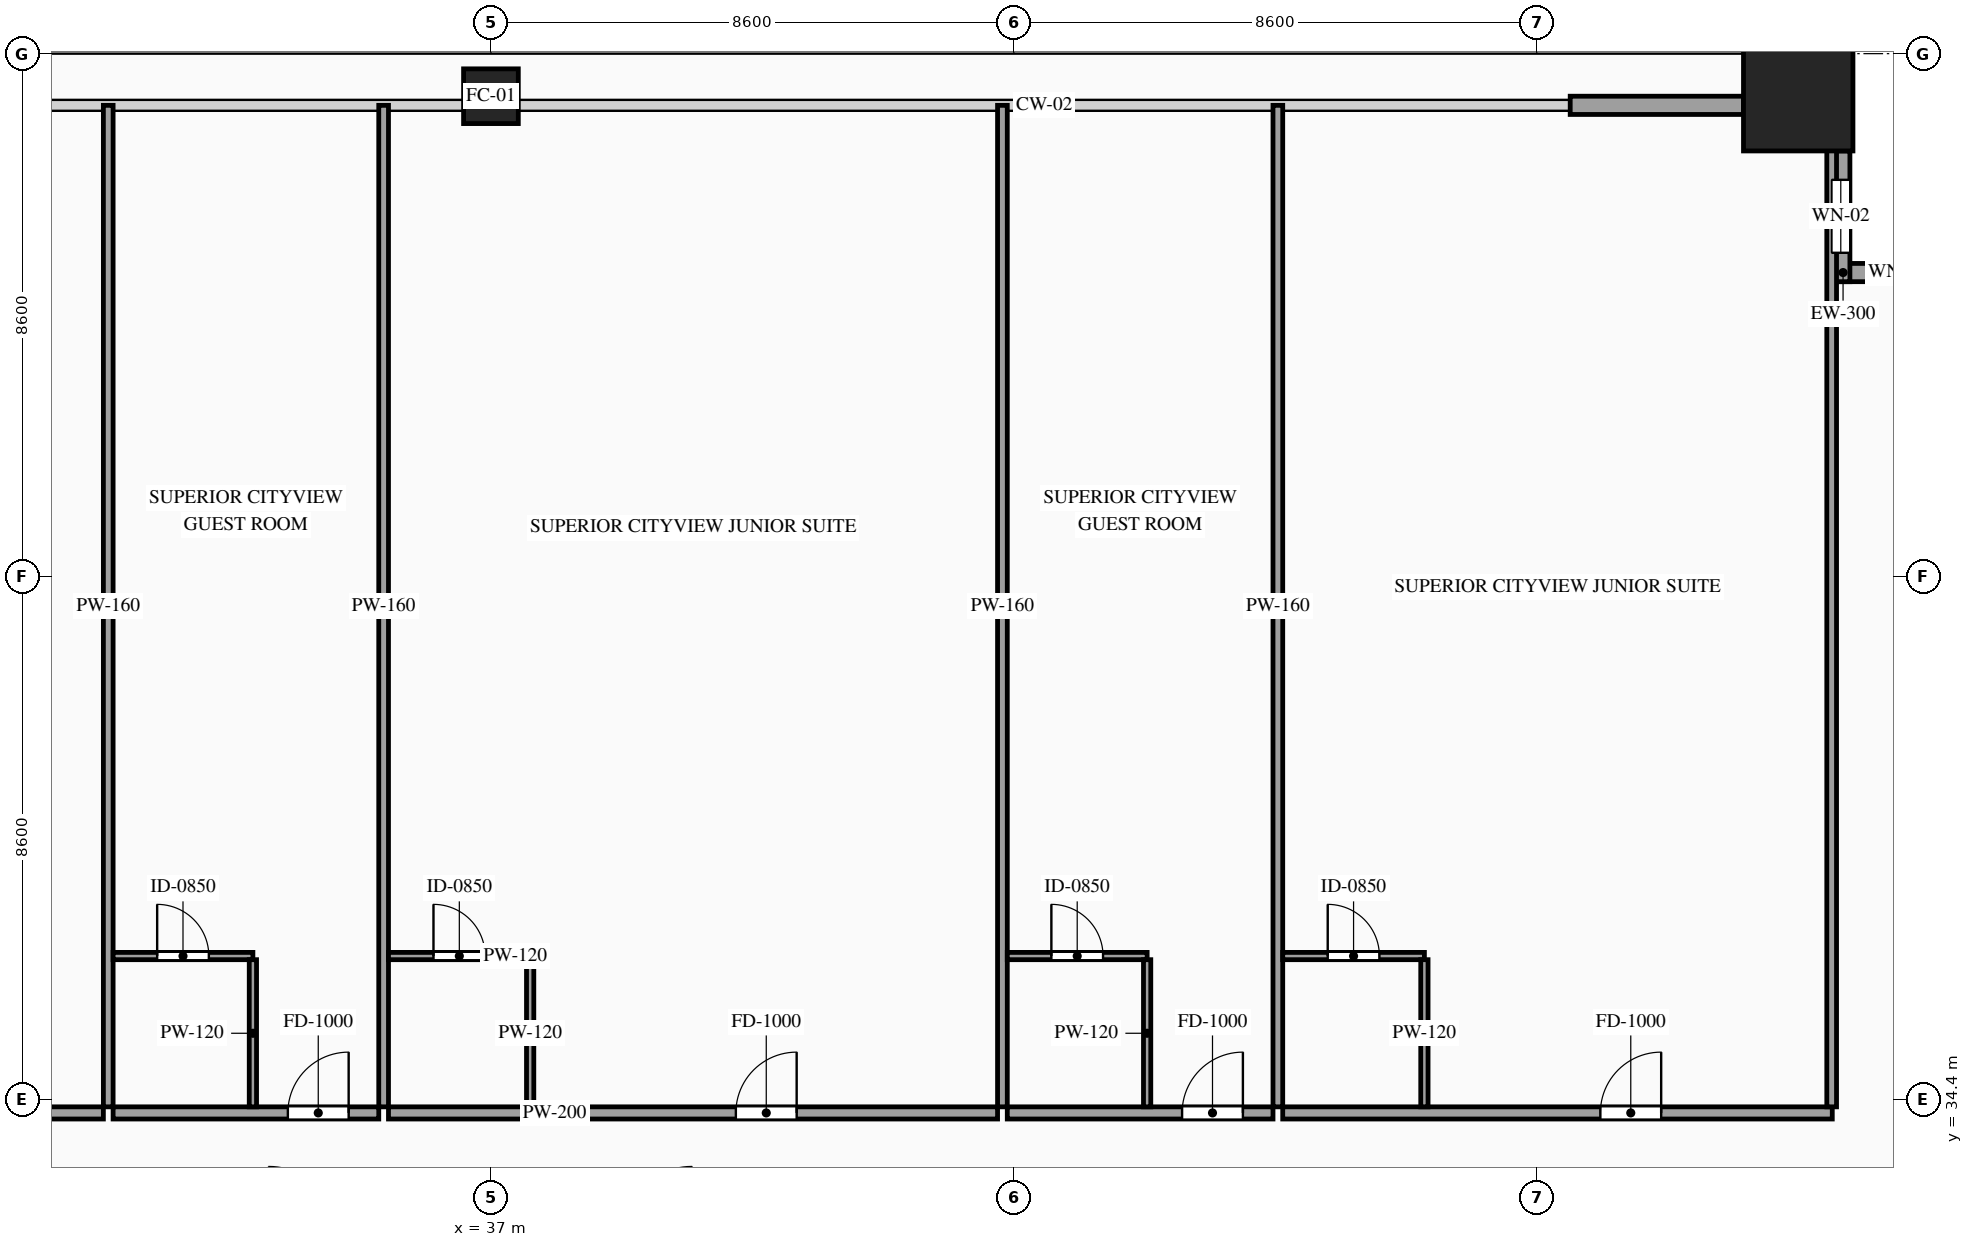
"""IFC4 building model, lengths in metres.
Left out: names, types, materials, properties, quantities, classifications, styles, units other than length and angle.
Written with IfcOpenShell. Run it as: python <this file> out.ifc"""

import sys

from ifc_helpers import new_model, si_unit, direction, frame, frame_2d, origin, origin_2d, place, context, subcontext, project, spatial, rectangle, hollow_rectangle, extrude, source, transform, mapped, element, fill, save


model = new_model("IFC4")
c1 = context("Model", 3, precision=1e-05, world=origin(), true_north=direction((0.0, 1.0)))
c2 = subcontext(c1, "Body", "Model", "MODEL_VIEW")
j1 = project(units=[si_unit("LENGTHUNIT", "METRE"), si_unit("PLANEANGLEUNIT", "RADIAN")], contexts=[c1])
p1 = place(None, origin())
s1 = spatial("IfcSite", under=j1, at=p1, CompositionType="ELEMENT")
p2 = place(p1, origin())
s2 = spatial("IfcBuilding", under=s1, at=p2, CompositionType="ELEMENT")
p3 = place(p2, frame((0.0, 0.0, 67.6)))
s3 = spatial("IfcBuildingStorey", under=s2, at=p3, CompositionType="ELEMENT", Elevation=67.6)
m1 = source(origin(), c2, "Body", "SweptSolid", [
    extrude(hollow_rectangle(XDim=0.9, YDim=0.9, WallThickness=0.042, at=origin_2d()), origin(), (0.0, 0.0, 1.0), 3.6),
])
p4 = place(p3, frame((37.0, 50.9, 0.0), z_axis=(0.0, 0.0, 1.0), x_axis=(1.0, 0.0, 0.0)))
e1 = element("IfcColumn", 1, at=p4, inside=s3, PredefinedType="COLUMN", context=c2, shape_type="MappedRepresentation", body=[
    mapped(m1, transform((0.0, 0.0, 0.0), scale=1.0)),
])
m2 = source(origin(), c2, "Body", "SweptSolid", [
    extrude(hollow_rectangle(XDim=1.8, YDim=1.8, WallThickness=0.08, at=origin_2d()), origin(), (0.0, 0.0, 1.0), 3.6),
])
p5 = place(p3, frame((58.5, 50.9, 0.0), z_axis=(0.0, 0.0, 1.0), x_axis=(1.0, 0.0, 0.0)))
e2 = element("IfcColumn", 2, at=p5, inside=s3, PredefinedType="COLUMN", context=c2, shape_type="MappedRepresentation", body=[
    mapped(m2, transform((0.0, 0.0, 0.0), scale=1.0)),
])
p6 = place(p3, frame((61.2, 48.0, 0.0), z_axis=(0.0, 0.0, 1.0), x_axis=(-1.0, 0.0, 0.0)))
e3 = element("IfcWall", 3, at=p6, inside=s3, PredefinedType="SOLIDWALL", context=c2, shape_type="SweptSolid", body=[
    extrude(rectangle(XDim=2.15, YDim=0.3, at=frame_2d((1.075, 0.0))), origin(), (0.0, 0.0, 1.0), 3.38),
])
p7 = place(p6, frame((0.625, 0.0, 0.85)))
e4 = element("IfcOpeningElement", 4, at=p7, cuts=e3, PredefinedType="OPENING", context=c2, shape_type="SweptSolid", body=[
    extrude(rectangle(XDim=0.9, YDim=1.5, at=frame_2d((0.45, 0.75))), frame((0.0, 0.165, 0.0), z_axis=(0.0, -1.0, 0.0), x_axis=(1.0, 0.0, 0.0)), (0.0, 0.0, 1.0), 0.33),
])
p8 = place(p3, frame((59.2, 47.85, 0.0), z_axis=(0.0, 0.0, 1.0), x_axis=(0.0, 1.0, 0.0)))
e5 = element("IfcWall", 5, at=p8, inside=s3, PredefinedType="SOLIDWALL", context=c2, shape_type="SweptSolid", body=[
    extrude(rectangle(XDim=2.15, YDim=0.3, at=frame_2d((1.075, 0.0))), origin(), (0.0, 0.0, 1.0), 3.38),
])
p9 = place(p8, frame((0.475, 0.0, 0.85)))
e6 = element("IfcOpeningElement", 6, at=p9, cuts=e5, PredefinedType="OPENING", context=c2, shape_type="SweptSolid", body=[
    extrude(rectangle(XDim=1.2, YDim=2.1, at=frame_2d((0.6, 1.05))), frame((0.0, 0.165, 0.0), z_axis=(0.0, -1.0, 0.0), x_axis=(1.0, 0.0, 0.0)), (0.0, 0.0, 1.0), 0.33),
])
m3 = source(origin(), c2, "Body", "SweptSolid", [
    extrude(rectangle(XDim=2.85, YDim=0.3, at=frame_2d((1.425, 0.0))), origin(), (0.0, 0.0, 1.0), 2.775),
])
p10 = place(p3, frame((54.75, 50.75, 0.0), z_axis=(0.0, 0.0, 1.0), x_axis=(1.0, 0.0, 0.0)))
e7 = element("IfcWall", 7, at=p10, inside=s3, PredefinedType="SOLIDWALL", context=c2, shape_type="MappedRepresentation", body=[
    mapped(m3, transform((0.0, 0.0, 0.0), scale=1.0)),
])
p11 = place(p3, frame((21.197, 34.18, 0.0), z_axis=(0.0, 0.0, 1.0), x_axis=(1.0, 0.0, 0.0)))
e8 = element("IfcWall", 8, at=p11, inside=s3, PredefinedType="PARTITIONING", context=c2, shape_type="SweptSolid", body=[
    extrude(rectangle(XDim=9.429, YDim=0.2, at=frame_2d((4.714, 0.0))), origin(), (0.0, 0.0, 1.0), 3.38),
])
p12 = place(p11, frame((5.42, 0.0, 0.0)))
e9 = element("IfcOpeningElement", 9, at=p12, cuts=e8, PredefinedType="OPENING", context=c2, shape_type="SweptSolid", body=[
    extrude(rectangle(XDim=1.0, YDim=2.2, at=frame_2d((0.5, 1.1))), frame((0.0, 0.115, 0.0), z_axis=(0.0, -1.0, 0.0), x_axis=(1.0, 0.0, 0.0)), (0.0, 0.0, 1.0), 0.23),
])
m4 = source(origin(), c2, "Body", "SweptSolid", [
    extrude(rectangle(XDim=16.47, YDim=0.16, at=frame_2d((8.235, 0.0))), origin(), (0.0, 0.0, 1.0), 3.38),
])
p13 = place(p3, frame((30.706, 34.28, 0.0), z_axis=(0.0, 0.0, 1.0), x_axis=(0.0, 1.0, 0.0)))
e10 = element("IfcWall", 10, at=p13, inside=s3, PredefinedType="PARTITIONING", context=c2, shape_type="MappedRepresentation", body=[
    mapped(m4, transform((0.0, 0.0, 0.0), scale=1.0)),
])
p14 = place(p3, frame((30.786, 34.18, 0.0), z_axis=(0.0, 0.0, 1.0), x_axis=(1.0, 0.0, 0.0)))
e11 = element("IfcWall", 11, at=p14, inside=s3, PredefinedType="PARTITIONING", context=c2, shape_type="SweptSolid", body=[
    extrude(rectangle(XDim=4.369, YDim=0.2, at=frame_2d((2.185, 0.0))), origin(), (0.0, 0.0, 1.0), 3.38),
])
p15 = place(p14, frame((2.874, 0.0, 0.0)))
e12 = element("IfcOpeningElement", 12, at=p15, cuts=e11, PredefinedType="OPENING", context=c2, shape_type="SweptSolid", body=[
    extrude(rectangle(XDim=1.0, YDim=2.2, at=frame_2d((0.5, 1.1))), frame((0.0, 0.115, 0.0), z_axis=(0.0, -1.0, 0.0), x_axis=(1.0, 0.0, 0.0)), (0.0, 0.0, 1.0), 0.23),
])
p16 = place(p3, frame((35.235, 34.28, 0.0), z_axis=(0.0, 0.0, 1.0), x_axis=(0.0, 1.0, 0.0)))
e13 = element("IfcWall", 13, at=p16, inside=s3, PredefinedType="PARTITIONING", context=c2, shape_type="MappedRepresentation", body=[
    mapped(m4, transform((0.0, 0.0, 0.0), scale=1.0)),
])
p17 = place(p3, frame((30.786, 36.76, 0.0), z_axis=(0.0, 0.0, 1.0), x_axis=(1.0, 0.0, 0.0)))
e14 = element("IfcWall", 14, at=p17, inside=s3, PredefinedType="PARTITIONING", context=c2, shape_type="SweptSolid", body=[
    extrude(rectangle(XDim=2.299, YDim=0.12, at=frame_2d((1.149, 0.0))), origin(), (0.0, 0.0, 1.0), 3.38),
])
p18 = place(p17, frame((0.725, 0.0, 0.0)))
e15 = element("IfcOpeningElement", 15, at=p18, cuts=e14, PredefinedType="OPENING", context=c2, shape_type="SweptSolid", body=[
    extrude(rectangle(XDim=0.85, YDim=2.1, at=frame_2d((0.425, 1.05))), frame((0.0, 0.075, 0.0), z_axis=(0.0, -1.0, 0.0), x_axis=(1.0, 0.0, 0.0)), (0.0, 0.0, 1.0), 0.15),
])
m5 = source(origin(), c2, "Body", "SweptSolid", [
    extrude(rectangle(XDim=2.42, YDim=0.12, at=frame_2d((1.21, 0.0))), origin(), (0.0, 0.0, 1.0), 3.38),
])
p19 = place(p3, frame((33.085, 34.28, 0.0), z_axis=(0.0, 0.0, 1.0), x_axis=(0.0, 1.0, 0.0)))
e16 = element("IfcWall", 16, at=p19, inside=s3, PredefinedType="PARTITIONING", context=c2, shape_type="MappedRepresentation", body=[
    mapped(m5, transform((0.0, 0.0, 0.0), scale=1.0)),
])
p20 = place(p3, frame((35.315, 34.18, 0.0), z_axis=(0.0, 0.0, 1.0), x_axis=(1.0, 0.0, 0.0)))
e17 = element("IfcWall", 17, at=p20, inside=s3, PredefinedType="PARTITIONING", context=c2, shape_type="SweptSolid", body=[
    extrude(rectangle(XDim=10.017, YDim=0.2, at=frame_2d((5.009, 0.0))), origin(), (0.0, 0.0, 1.0), 3.38),
])
p21 = place(p20, frame((5.713, 0.0, 0.0)))
e18 = element("IfcOpeningElement", 18, at=p21, cuts=e17, PredefinedType="OPENING", context=c2, shape_type="SweptSolid", body=[
    extrude(rectangle(XDim=1.0, YDim=2.2, at=frame_2d((0.5, 1.1))), frame((0.0, 0.115, 0.0), z_axis=(0.0, -1.0, 0.0), x_axis=(1.0, 0.0, 0.0)), (0.0, 0.0, 1.0), 0.23),
])
p22 = place(p3, frame((45.412, 34.28, 0.0), z_axis=(0.0, 0.0, 1.0), x_axis=(0.0, 1.0, 0.0)))
e19 = element("IfcWall", 19, at=p22, inside=s3, PredefinedType="PARTITIONING", context=c2, shape_type="MappedRepresentation", body=[
    mapped(m4, transform((0.0, 0.0, 0.0), scale=1.0)),
])
p23 = place(p3, frame((35.315, 36.76, 0.0), z_axis=(0.0, 0.0, 1.0), x_axis=(1.0, 0.0, 0.0)))
e20 = element("IfcWall", 20, at=p23, inside=s3, PredefinedType="PARTITIONING", context=c2, shape_type="SweptSolid", body=[
    extrude(rectangle(XDim=2.33, YDim=0.12, at=frame_2d((1.165, 0.0))), origin(), (0.0, 0.0, 1.0), 3.38),
])
p24 = place(p23, frame((0.74, 0.0, 0.0)))
e21 = element("IfcOpeningElement", 21, at=p24, cuts=e20, PredefinedType="OPENING", context=c2, shape_type="SweptSolid", body=[
    extrude(rectangle(XDim=0.85, YDim=2.1, at=frame_2d((0.425, 1.05))), frame((0.0, 0.075, 0.0), z_axis=(0.0, -1.0, 0.0), x_axis=(1.0, 0.0, 0.0)), (0.0, 0.0, 1.0), 0.15),
])
p25 = place(p3, frame((37.645, 34.28, 0.0), z_axis=(0.0, 0.0, 1.0), x_axis=(0.0, 1.0, 0.0)))
e22 = element("IfcWall", 22, at=p25, inside=s3, PredefinedType="PARTITIONING", context=c2, shape_type="MappedRepresentation", body=[
    mapped(m5, transform((0.0, 0.0, 0.0), scale=1.0)),
])
p26 = place(p3, frame((45.492, 34.18, 0.0), z_axis=(0.0, 0.0, 1.0), x_axis=(1.0, 0.0, 0.0)))
e23 = element("IfcWall", 23, at=p26, inside=s3, PredefinedType="PARTITIONING", context=c2, shape_type="SweptSolid", body=[
    extrude(rectangle(XDim=4.37, YDim=0.2, at=frame_2d((2.185, 0.0))), origin(), (0.0, 0.0, 1.0), 3.38),
])
p27 = place(p26, frame((2.875, 0.0, 0.0)))
e24 = element("IfcOpeningElement", 24, at=p27, cuts=e23, PredefinedType="OPENING", context=c2, shape_type="SweptSolid", body=[
    extrude(rectangle(XDim=1.0, YDim=2.2, at=frame_2d((0.5, 1.1))), frame((0.0, 0.115, 0.0), z_axis=(0.0, -1.0, 0.0), x_axis=(1.0, 0.0, 0.0)), (0.0, 0.0, 1.0), 0.23),
])
p28 = place(p3, frame((49.942, 34.28, 0.0), z_axis=(0.0, 0.0, 1.0), x_axis=(0.0, 1.0, 0.0)))
e25 = element("IfcWall", 25, at=p28, inside=s3, PredefinedType="PARTITIONING", context=c2, shape_type="MappedRepresentation", body=[
    mapped(m4, transform((0.0, 0.0, 0.0), scale=1.0)),
])
p29 = place(p3, frame((45.492, 36.76, 0.0), z_axis=(0.0, 0.0, 1.0), x_axis=(1.0, 0.0, 0.0)))
e26 = element("IfcWall", 26, at=p29, inside=s3, PredefinedType="PARTITIONING", context=c2, shape_type="SweptSolid", body=[
    extrude(rectangle(XDim=2.3, YDim=0.12, at=frame_2d((1.15, 0.0))), origin(), (0.0, 0.0, 1.0), 3.38),
])
p30 = place(p29, frame((0.725, 0.0, 0.0)))
e27 = element("IfcOpeningElement", 27, at=p30, cuts=e26, PredefinedType="OPENING", context=c2, shape_type="SweptSolid", body=[
    extrude(rectangle(XDim=0.85, YDim=2.1, at=frame_2d((0.425, 1.05))), frame((0.0, 0.075, 0.0), z_axis=(0.0, -1.0, 0.0), x_axis=(1.0, 0.0, 0.0)), (0.0, 0.0, 1.0), 0.15),
])
p31 = place(p3, frame((47.792, 34.28, 0.0), z_axis=(0.0, 0.0, 1.0), x_axis=(0.0, 1.0, 0.0)))
e28 = element("IfcWall", 28, at=p31, inside=s3, PredefinedType="PARTITIONING", context=c2, shape_type="MappedRepresentation", body=[
    mapped(m5, transform((0.0, 0.0, 0.0), scale=1.0)),
])
p32 = place(p3, frame((50.022, 34.18, 0.0), z_axis=(0.0, 0.0, 1.0), x_axis=(1.0, 0.0, 0.0)))
e29 = element("IfcWall", 29, at=p32, inside=s3, PredefinedType="PARTITIONING", context=c2, shape_type="SweptSolid", body=[
    extrude(rectangle(XDim=9.038, YDim=0.2, at=frame_2d((4.519, 0.0))), origin(), (0.0, 0.0, 1.0), 3.38),
])
p33 = place(p32, frame((5.224, 0.0, 0.0)))
e30 = element("IfcOpeningElement", 30, at=p33, cuts=e29, PredefinedType="OPENING", context=c2, shape_type="SweptSolid", body=[
    extrude(rectangle(XDim=1.0, YDim=2.2, at=frame_2d((0.5, 1.1))), frame((0.0, 0.115, 0.0), z_axis=(0.0, -1.0, 0.0), x_axis=(1.0, 0.0, 0.0)), (0.0, 0.0, 1.0), 0.23),
])
m6 = source(origin(), c2, "Body", "SweptSolid", [
    extrude(rectangle(XDim=16.32, YDim=0.16, at=frame_2d((8.16, 0.0))), origin(), (0.0, 0.0, 1.0), 3.38),
])
p34 = place(p3, frame((59.05, 34.28, 0.0), z_axis=(0.0, 0.0, 1.0), x_axis=(0.0, 1.0, 0.0)))
e31 = element("IfcWall", 31, at=p34, inside=s3, PredefinedType="PARTITIONING", context=c2, shape_type="MappedRepresentation", body=[
    mapped(m6, transform((0.0, 0.0, 0.0), scale=1.0)),
])
p35 = place(p3, frame((50.022, 36.76, 0.0), z_axis=(0.0, 0.0, 1.0), x_axis=(1.0, 0.0, 0.0)))
e32 = element("IfcWall", 32, at=p35, inside=s3, PredefinedType="PARTITIONING", context=c2, shape_type="SweptSolid", body=[
    extrude(rectangle(XDim=2.33, YDim=0.12, at=frame_2d((1.165, 0.0))), origin(), (0.0, 0.0, 1.0), 3.38),
])
p36 = place(p35, frame((0.74, 0.0, 0.0)))
e33 = element("IfcOpeningElement", 33, at=p36, cuts=e32, PredefinedType="OPENING", context=c2, shape_type="SweptSolid", body=[
    extrude(rectangle(XDim=0.85, YDim=2.1, at=frame_2d((0.425, 1.05))), frame((0.0, 0.075, 0.0), z_axis=(0.0, -1.0, 0.0), x_axis=(1.0, 0.0, 0.0)), (0.0, 0.0, 1.0), 0.15),
])
p37 = place(p3, frame((52.352, 34.28, 0.0), z_axis=(0.0, 0.0, 1.0), x_axis=(0.0, 1.0, 0.0)))
e34 = element("IfcWall", 34, at=p37, inside=s3, PredefinedType="PARTITIONING", context=c2, shape_type="MappedRepresentation", body=[
    mapped(m5, transform((0.0, 0.0, 0.0), scale=1.0)),
])
m7 = source(origin(), c2, "Body", "SweptSolid", [
    extrude(rectangle(XDim=0.9, YDim=1.5, at=frame_2d((0.45, 0.75))), frame((0.0, 0.03, 0.0), z_axis=(0.0, -1.0, 0.0), x_axis=(1.0, 0.0, 0.0)), (0.0, 0.0, 1.0), 0.06),
])
p38 = place(p7, origin())
e35 = element("IfcWindow", 35, at=p38, inside=s3, PartitioningType="SINGLE_PANEL", PredefinedType="WINDOW", context=c2, shape_type="MappedRepresentation", body=[
    mapped(m7, transform((0.0, 0.0, 0.0), scale=1.0)),
])
fill(e4, e35)
m8 = source(origin(), c2, "Body", "SweptSolid", [
    extrude(rectangle(XDim=1.2, YDim=2.1, at=frame_2d((0.6, 1.05))), frame((0.0, 0.03, 0.0), z_axis=(0.0, -1.0, 0.0), x_axis=(1.0, 0.0, 0.0)), (0.0, 0.0, 1.0), 0.06),
])
p39 = place(p9, origin())
e36 = element("IfcWindow", 36, at=p39, inside=s3, PartitioningType="SINGLE_PANEL", PredefinedType="WINDOW", context=c2, shape_type="MappedRepresentation", body=[
    mapped(m8, transform((0.0, 0.0, 0.0), scale=1.0)),
])
fill(e6, e36)
m9 = source(origin(), c2, "Body", "SweptSolid", [
    extrude(rectangle(XDim=1.0, YDim=2.2, at=frame_2d((0.5, 1.1))), frame((0.0, 0.025, 0.0), z_axis=(0.0, -1.0, 0.0), x_axis=(1.0, 0.0, 0.0)), (0.0, 0.0, 1.0), 0.05),
])
p40 = place(p15, origin())
e37 = element("IfcDoor", 37, at=p40, inside=s3, OperationType="SINGLE_SWING_RIGHT", PredefinedType="DOOR", context=c2, shape_type="MappedRepresentation", body=[
    mapped(m9, transform((0.0, 0.0, 0.0), scale=1.0)),
])
fill(e12, e37)
m10 = source(origin(), c2, "Body", "SweptSolid", [
    extrude(rectangle(XDim=0.85, YDim=2.1, at=frame_2d((0.425, 1.05))), frame((0.0, 0.025, 0.0), z_axis=(0.0, -1.0, 0.0), x_axis=(1.0, 0.0, 0.0)), (0.0, 0.0, 1.0), 0.05),
])
p41 = place(p18, origin())
e38 = element("IfcDoor", 38, at=p41, inside=s3, OperationType="SINGLE_SWING_LEFT", PredefinedType="DOOR", context=c2, shape_type="MappedRepresentation", body=[
    mapped(m10, transform((0.0, 0.0, 0.0), scale=1.0)),
])
fill(e15, e38)
p42 = place(p21, origin())
e39 = element("IfcDoor", 39, at=p42, inside=s3, OperationType="SINGLE_SWING_RIGHT", PredefinedType="DOOR", context=c2, shape_type="MappedRepresentation", body=[
    mapped(m9, transform((0.0, 0.0, 0.0), scale=1.0)),
])
fill(e18, e39)
p43 = place(p24, origin())
e40 = element("IfcDoor", 40, at=p43, inside=s3, OperationType="SINGLE_SWING_LEFT", PredefinedType="DOOR", context=c2, shape_type="MappedRepresentation", body=[
    mapped(m10, transform((0.0, 0.0, 0.0), scale=1.0)),
])
fill(e21, e40)
p44 = place(p27, origin())
e41 = element("IfcDoor", 41, at=p44, inside=s3, OperationType="SINGLE_SWING_RIGHT", PredefinedType="DOOR", context=c2, shape_type="MappedRepresentation", body=[
    mapped(m9, transform((0.0, 0.0, 0.0), scale=1.0)),
])
fill(e24, e41)
p45 = place(p30, origin())
e42 = element("IfcDoor", 42, at=p45, inside=s3, OperationType="SINGLE_SWING_LEFT", PredefinedType="DOOR", context=c2, shape_type="MappedRepresentation", body=[
    mapped(m10, transform((0.0, 0.0, 0.0), scale=1.0)),
])
fill(e27, e42)
p46 = place(p33, origin())
e43 = element("IfcDoor", 43, at=p46, inside=s3, OperationType="SINGLE_SWING_RIGHT", PredefinedType="DOOR", context=c2, shape_type="MappedRepresentation", body=[
    mapped(m9, transform((0.0, 0.0, 0.0), scale=1.0)),
])
fill(e30, e43)
p47 = place(p36, origin())
e44 = element("IfcDoor", 44, at=p47, inside=s3, OperationType="SINGLE_SWING_LEFT", PredefinedType="DOOR", context=c2, shape_type="MappedRepresentation", body=[
    mapped(m10, transform((0.0, 0.0, 0.0), scale=1.0)),
])
fill(e33, e44)
save(model, sys.argv[1])
